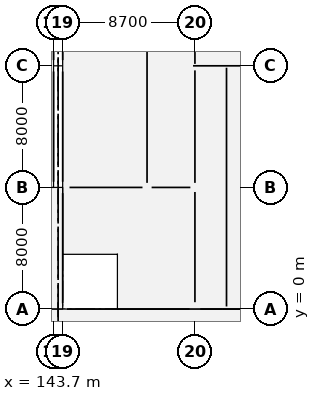
"""IFC4 building model, lengths in metres.
Left out: names, types, materials, properties, quantities, classifications, styles, units other than length and angle.
Written with IfcOpenShell. Run it as: python <this file> out.ifc"""

import sys

from ifc_helpers import new_model, si_unit, direction, frame, frame_2d, origin, origin_2d, place, context, subcontext, project, spatial, rectangle, extrude, element, fill, save


model = new_model("IFC4")
c1 = context("Model", 3, precision=1e-05, world=origin(), true_north=direction((0.0, 1.0)))
c2 = subcontext(c1, "Body", "Model", "MODEL_VIEW")
j1 = project(units=[si_unit("LENGTHUNIT", "METRE"), si_unit("PLANEANGLEUNIT", "RADIAN")], contexts=[c1])
p1 = place(None, origin())
s1 = spatial("IfcSite", under=j1, at=p1, CompositionType="ELEMENT")
p2 = place(p1, origin())
s2 = spatial("IfcBuilding", under=s1, at=p2, CompositionType="ELEMENT")
p3 = place(p2, origin())
s3 = spatial("IfcBuildingStorey", under=s2, at=p3, CompositionType="ELEMENT", Elevation=0.0)
for number, where, z_axis, x_axis in (
    (1, (143.7, 8.0, -0.5), (0.0, 0.0, 1.0), (1.0, 0.0, 0.0)),
    (2, (143.7, 16.0, -0.5), (0.0, 0.0, 1.0), (1.0, 0.0, 0.0)),
    (3, (144.3, 0.0, -0.5), (0.0, 0.0, 1.0), (1.0, 0.0, 0.0)),
    (4, (144.3, 8.0, -0.5), (0.0, 0.0, 1.0), (1.0, 0.0, 0.0)),
    (5, (144.3, 16.0, -0.5), (0.0, 0.0, 1.0), (1.0, 0.0, 0.0)),
):
    element("IfcColumn", number, at=place(p3, frame(where, z_axis=z_axis, x_axis=x_axis)), inside=s3, PredefinedType="COLUMN", context=c2, shape_type="SweptSolid", body=[
        extrude(rectangle(XDim=0.55, YDim=0.75, at=origin_2d()), origin(), (0.0, 0.0, 1.0), 6.8),
    ])
for number, where, z_axis, x_axis in (
    (6, (153.0, 0.0, -0.5), (0.0, 0.0, 1.0), (1.0, 0.0, 0.0)),
    (7, (153.0, 8.0, -0.5), (0.0, 0.0, 1.0), (1.0, 0.0, 0.0)),
    (8, (153.0, 16.0, -0.5), (0.0, 0.0, 1.0), (1.0, 0.0, 0.0)),
):
    element("IfcColumn", number, at=place(p3, frame(where, z_axis=z_axis, x_axis=x_axis)), inside=s3, PredefinedType="COLUMN", context=c2, shape_type="SweptSolid", body=[
        extrude(rectangle(XDim=0.7, YDim=0.7, at=origin_2d()), origin(), (0.0, 0.0, 1.0), 6.8),
    ])
p4 = place(p3, frame((143.7, 8.375, 0.0), z_axis=(0.0, 0.0, 1.0), x_axis=(0.0, 1.0, 0.0)))
e9 = element("IfcWall", 9, at=p4, inside=s3, PredefinedType="SOLIDWALL", context=c2, shape_type="SweptSolid", body=[
    extrude(rectangle(XDim=7.25, YDim=0.34, at=frame_2d((3.625, 0.0))), origin(), (0.0, 0.0, 1.0), 4.98),
])
p5 = place(p4, frame((1.517, 0.0, 0.85)))
e10 = element("IfcOpeningElement", 10, at=p5, cuts=e9, PredefinedType="OPENING", context=c2, shape_type="SweptSolid", body=[
    extrude(rectangle(XDim=1.8, YDim=3.15, at=frame_2d((0.9, 1.575))), frame((0.0, 0.18, 0.0), z_axis=(0.0, -1.0, 0.0), x_axis=(1.0, 0.0, 0.0)), (0.0, 0.0, 1.0), 0.36),
])
p6 = place(p4, frame((3.933, 0.0, 0.85)))
e11 = element("IfcOpeningElement", 11, at=p6, cuts=e9, PredefinedType="OPENING", context=c2, shape_type="SweptSolid", body=[
    extrude(rectangle(XDim=1.8, YDim=3.15, at=frame_2d((0.9, 1.575))), frame((0.0, 0.18, 0.0), z_axis=(0.0, -1.0, 0.0), x_axis=(1.0, 0.0, 0.0)), (0.0, 0.0, 1.0), 0.36),
])
p7 = place(p3, frame((143.7, 16.375, 0.0), z_axis=(0.0, 0.0, 1.0), x_axis=(0.0, 1.0, 0.0)))
e12 = element("IfcWall", 12, at=p7, inside=s3, PredefinedType="SOLIDWALL", context=c2, shape_type="SweptSolid", body=[
    extrude(rectangle(XDim=7.25, YDim=0.34, at=frame_2d((3.625, 0.0))), origin(), (0.0, 0.0, 1.0), 4.98),
])
p8 = place(p7, frame((1.517, 0.0, 0.85)))
e13 = element("IfcOpeningElement", 13, at=p8, cuts=e12, PredefinedType="OPENING", context=c2, shape_type="SweptSolid", body=[
    extrude(rectangle(XDim=1.8, YDim=3.15, at=frame_2d((0.9, 1.575))), frame((0.0, 0.18, 0.0), z_axis=(0.0, -1.0, 0.0), x_axis=(1.0, 0.0, 0.0)), (0.0, 0.0, 1.0), 0.36),
])
p9 = place(p7, frame((3.933, 0.0, 0.85)))
e14 = element("IfcOpeningElement", 14, at=p9, cuts=e12, PredefinedType="OPENING", context=c2, shape_type="SweptSolid", body=[
    extrude(rectangle(XDim=1.8, YDim=3.15, at=frame_2d((0.9, 1.575))), frame((0.0, 0.18, 0.0), z_axis=(0.0, -1.0, 0.0), x_axis=(1.0, 0.0, 0.0)), (0.0, 0.0, 1.0), 0.36),
])
p10 = place(p3, frame((144.575, 0.0, 0.0), z_axis=(0.0, 0.0, 1.0), x_axis=(1.0, 0.0, 0.0)))
e15 = element("IfcWall", 15, at=p10, inside=s3, PredefinedType="SOLIDWALL", context=c2, shape_type="SweptSolid", body=[
    extrude(rectangle(XDim=8.075, YDim=0.3, at=frame_2d((4.038, 0.0))), origin(), (0.0, 0.0, 1.0), 0.45),
])
p11 = place(p3, frame((154.8, 0.0, 0.0), z_axis=(0.0, 0.0, 1.0), x_axis=(-1.0, 0.0, 0.0)))
e16 = element("IfcWall", 16, at=p11, inside=s3, PredefinedType="SOLIDWALL", context=c2, shape_type="SweptSolid", body=[
    extrude(rectangle(XDim=1.45, YDim=0.34, at=frame_2d((0.725, 0.0))), origin(), (0.0, 0.0, 1.0), 5.1),
])
p12 = place(p11, frame((0.1, 0.0, 0.0)))
e17 = element("IfcOpeningElement", 17, at=p12, cuts=e16, PredefinedType="OPENING", context=c2, shape_type="SweptSolid", body=[
    extrude(rectangle(XDim=1.2, YDim=2.25, at=frame_2d((0.6, 1.125))), frame((0.0, 0.18, 0.0), z_axis=(0.0, -1.0, 0.0), x_axis=(1.0, 0.0, 0.0)), (0.0, 0.0, 1.0), 0.36),
])
p13 = place(p3, frame((144.3, 0.375, 0.0), z_axis=(0.0, 0.0, 1.0), x_axis=(0.0, 1.0, 0.0)))
e18 = element("IfcWall", 18, at=p13, inside=s3, PredefinedType="SOLIDWALL", context=c2, shape_type="SweptSolid", body=[
    extrude(rectangle(XDim=7.25, YDim=0.34, at=frame_2d((3.625, 0.0))), origin(), (0.0, 0.0, 1.0), 5.1),
])
p14 = place(p13, frame((1.417, 0.0, 0.85)))
e19 = element("IfcOpeningElement", 19, at=p14, cuts=e18, PredefinedType="OPENING", context=c2, shape_type="SweptSolid", body=[
    extrude(rectangle(XDim=2.0, YDim=3.3, at=frame_2d((1.0, 1.65))), frame((0.0, 0.18, 0.0), z_axis=(0.0, -1.0, 0.0), x_axis=(1.0, 0.0, 0.0)), (0.0, 0.0, 1.0), 0.36),
])
p15 = place(p13, frame((3.833, 0.0, 0.85)))
e20 = element("IfcOpeningElement", 20, at=p15, cuts=e18, PredefinedType="OPENING", context=c2, shape_type="SweptSolid", body=[
    extrude(rectangle(XDim=2.0, YDim=3.3, at=frame_2d((1.0, 1.65))), frame((0.0, 0.18, 0.0), z_axis=(0.0, -1.0, 0.0), x_axis=(1.0, 0.0, 0.0)), (0.0, 0.0, 1.0), 0.36),
])
p16 = place(p3, frame((144.3, 8.375, 0.0), z_axis=(0.0, 0.0, 1.0), x_axis=(0.0, 1.0, 0.0)))
e21 = element("IfcWall", 21, at=p16, inside=s3, PredefinedType="SOLIDWALL", context=c2, shape_type="SweptSolid", body=[
    extrude(rectangle(XDim=7.25, YDim=0.34, at=frame_2d((3.625, 0.0))), origin(), (0.0, 0.0, 1.0), 5.1),
])
p17 = place(p16, frame((1.517, 0.0, 0.85)))
e22 = element("IfcOpeningElement", 22, at=p17, cuts=e21, PredefinedType="OPENING", context=c2, shape_type="SweptSolid", body=[
    extrude(rectangle(XDim=1.8, YDim=3.15, at=frame_2d((0.9, 1.575))), frame((0.0, 0.18, 0.0), z_axis=(0.0, -1.0, 0.0), x_axis=(1.0, 0.0, 0.0)), (0.0, 0.0, 1.0), 0.36),
])
p18 = place(p16, frame((3.933, 0.0, 0.85)))
e23 = element("IfcOpeningElement", 23, at=p18, cuts=e21, PredefinedType="OPENING", context=c2, shape_type="SweptSolid", body=[
    extrude(rectangle(XDim=1.8, YDim=3.15, at=frame_2d((0.9, 1.575))), frame((0.0, 0.18, 0.0), z_axis=(0.0, -1.0, 0.0), x_axis=(1.0, 0.0, 0.0)), (0.0, 0.0, 1.0), 0.36),
])
p19 = place(p3, frame((144.3, 16.375, 0.0), z_axis=(0.0, 0.0, 1.0), x_axis=(0.0, 1.0, 0.0)))
e24 = element("IfcWall", 24, at=p19, inside=s3, PredefinedType="SOLIDWALL", context=c2, shape_type="SweptSolid", body=[
    extrude(rectangle(XDim=7.25, YDim=0.34, at=frame_2d((3.625, 0.0))), origin(), (0.0, 0.0, 1.0), 5.1),
])
p20 = place(p19, frame((1.417, 0.0, 0.85)))
e25 = element("IfcOpeningElement", 25, at=p20, cuts=e24, PredefinedType="OPENING", context=c2, shape_type="SweptSolid", body=[
    extrude(rectangle(XDim=2.0, YDim=3.3, at=frame_2d((1.0, 1.65))), frame((0.0, 0.18, 0.0), z_axis=(0.0, -1.0, 0.0), x_axis=(1.0, 0.0, 0.0)), (0.0, 0.0, 1.0), 0.36),
])
p21 = place(p19, frame((3.833, 0.0, 0.85)))
e26 = element("IfcOpeningElement", 26, at=p21, cuts=e24, PredefinedType="OPENING", context=c2, shape_type="SweptSolid", body=[
    extrude(rectangle(XDim=2.0, YDim=3.3, at=frame_2d((1.0, 1.65))), frame((0.0, 0.18, 0.0), z_axis=(0.0, -1.0, 0.0), x_axis=(1.0, 0.0, 0.0)), (0.0, 0.0, 1.0), 0.36),
])
p22 = place(p3, frame((162.125, 16.0, -0.5), z_axis=(0.0, 0.0, 1.0), x_axis=(-1.0, 0.0, 0.0)))
e27 = element("IfcWall", 27, at=p22, inside=s3, PredefinedType="SOLIDWALL", context=c2, shape_type="SweptSolid", body=[
    extrude(rectangle(XDim=9.25, YDim=0.25, at=frame_2d((4.625, 0.0))), origin(), (0.0, 0.0, 1.0), 6.8),
])
p23 = place(p22, frame((7.425, 0.0, 0.5)))
e28 = element("IfcOpeningElement", 28, at=p23, cuts=e27, PredefinedType="OPENING", context=c2, shape_type="SweptSolid", body=[
    extrude(rectangle(XDim=1.2, YDim=2.2, at=frame_2d((0.6, 1.1))), frame((0.0, 0.135, 0.0), z_axis=(0.0, -1.0, 0.0), x_axis=(1.0, 0.0, 0.0)), (0.0, 0.0, 1.0), 0.27),
])
p24 = place(p3, frame((153.0, 16.125, -0.5), z_axis=(0.0, 0.0, 1.0), x_axis=(0.0, 1.0, 0.0)))
e29 = element("IfcWall", 29, at=p24, inside=s3, PredefinedType="SOLIDWALL", context=c2, shape_type="SweptSolid", body=[
    extrude(rectangle(XDim=7.75, YDim=0.25, at=frame_2d((3.875, 0.0))), origin(), (0.0, 0.0, 1.0), 6.8),
])
p25 = place(p24, frame((1.15, 0.0, 0.5)))
e30 = element("IfcOpeningElement", 30, at=p25, cuts=e29, PredefinedType="OPENING", context=c2, shape_type="SweptSolid", body=[
    extrude(rectangle(XDim=1.2, YDim=2.2, at=frame_2d((0.6, 1.1))), frame((0.0, 0.135, 0.0), z_axis=(0.0, -1.0, 0.0), x_axis=(1.0, 0.0, 0.0)), (0.0, 0.0, 1.0), 0.27),
])
p26 = place(p3, frame((153.0, 0.45, 0.0), z_axis=(0.0, 0.0, 1.0), x_axis=(0.0, 1.0, 0.0)))
e31 = element("IfcWall", 31, at=p26, inside=s3, PredefinedType="PARTITIONING", context=c2, shape_type="SweptSolid", body=[
    extrude(rectangle(XDim=7.25, YDim=0.1, at=frame_2d((3.625, 0.0))), origin(), (0.0, 0.0, 1.0), 5.35),
])
p27 = place(p26, frame((3.085, 0.0, 0.0)))
e32 = element("IfcOpeningElement", 32, at=p27, cuts=e31, PredefinedType="OPENING", context=c2, shape_type="SweptSolid", body=[
    extrude(rectangle(XDim=1.08, YDim=2.15, at=frame_2d((0.54, 1.075))), frame((0.0, 0.06, 0.0), z_axis=(0.0, -1.0, 0.0), x_axis=(1.0, 0.0, 0.0)), (0.0, 0.0, 1.0), 0.12),
])
p28 = place(p3, frame((150.15, 8.0, 0.0), z_axis=(0.0, 0.0, 1.0), x_axis=(1.0, 0.0, 0.0)))
e33 = element("IfcWall", 33, at=p28, inside=s3, PredefinedType="PARTITIONING", context=c2, shape_type="SweptSolid", body=[
    extrude(rectangle(XDim=2.55, YDim=0.14, at=frame_2d((1.275, 0.0))), origin(), (0.0, 0.0, 1.0), 5.25),
])
p29 = place(p28, frame((0.805, 0.0, 0.0)))
e34 = element("IfcOpeningElement", 34, at=p29, cuts=e33, PredefinedType="OPENING", context=c2, shape_type="SweptSolid", body=[
    extrude(rectangle(XDim=0.94, YDim=2.14, at=frame_2d((0.47, 1.07))), frame((0.0, 0.08, 0.0), z_axis=(0.0, -1.0, 0.0), x_axis=(1.0, 0.0, 0.0)), (0.0, 0.0, 1.0), 0.16),
])
p30 = place(p3, frame((144.75, 8.0, 0.0), z_axis=(0.0, 0.0, 1.0), x_axis=(1.0, 0.0, 0.0)))
e35 = element("IfcWall", 35, at=p30, inside=s3, PredefinedType="PARTITIONING", context=c2, shape_type="SweptSolid", body=[
    extrude(rectangle(XDim=4.8, YDim=0.125, at=frame_2d((2.4, 0.0))), origin(), (0.0, 0.0, 1.0), 5.25),
])
p31 = place(p3, frame((153.0, 8.3, 0.0), z_axis=(0.0, 0.0, 1.0), x_axis=(0.0, 1.0, 0.0)))
e36 = element("IfcWall", 36, at=p31, inside=s3, PredefinedType="PARTITIONING", context=c2, shape_type="SweptSolid", body=[
    extrude(rectangle(XDim=7.4, YDim=0.1, at=frame_2d((3.7, 0.0))), origin(), (0.0, 0.0, 1.0), 5.35),
])
p32 = place(p31, frame((2.83, 0.0, 0.0)))
e37 = element("IfcOpeningElement", 37, at=p32, cuts=e36, PredefinedType="OPENING", context=c2, shape_type="SweptSolid", body=[
    extrude(rectangle(XDim=1.74, YDim=2.28, at=frame_2d((0.87, 1.14))), frame((0.0, 0.06, 0.0), z_axis=(0.0, -1.0, 0.0), x_axis=(1.0, 0.0, 0.0)), (0.0, 0.0, 1.0), 0.12),
])
p33 = place(p3, frame((149.85, 8.3, 0.0), z_axis=(0.0, 0.0, 1.0), x_axis=(0.0, 1.0, 0.0)))
e38 = element("IfcWall", 38, at=p33, inside=s3, PredefinedType="PARTITIONING", context=c2, shape_type="SweptSolid", body=[
    extrude(rectangle(XDim=15.4, YDim=0.1, at=frame_2d((7.7, 0.0))), origin(), (0.0, 0.0, 1.0), 5.95),
])
p34 = place(p33, frame((3.31, 0.0, 0.0)))
e39 = element("IfcOpeningElement", 39, at=p34, cuts=e38, PredefinedType="OPENING", context=c2, shape_type="SweptSolid", body=[
    extrude(rectangle(XDim=1.08, YDim=2.15, at=frame_2d((0.54, 1.075))), frame((0.0, 0.06, 0.0), z_axis=(0.0, -1.0, 0.0), x_axis=(1.0, 0.0, 0.0)), (0.0, 0.0, 1.0), 0.12),
])
p35 = place(p3, frame((155.077, 0.17, 0.0), z_axis=(0.0, 0.0, 1.0), x_axis=(0.0, 1.0, 0.0)))
e40 = element("IfcWall", 40, at=p35, inside=s3, PredefinedType="STANDARD", context=c2, shape_type="SweptSolid", body=[
    extrude(rectangle(XDim=15.705, YDim=0.255, at=frame_2d((7.853, 0.0))), origin(), (0.0, 0.0, 1.0), 5.95),
])
p36 = place(p3, frame((154.8, 0.0, 0.0), z_axis=(0.0, 0.0, 1.0), x_axis=(1.0, 0.0, 0.0)))
e41 = element("IfcWall", 41, at=p36, inside=s3, PredefinedType="SOLIDWALL", context=c2, shape_type="SweptSolid", body=[
    extrude(rectangle(XDim=6.85, YDim=0.34, at=frame_2d((3.425, 0.0))), origin(), (0.0, 0.0, 1.0), 5.1),
])
p37 = place(p36, frame((1.5, 0.0, 0.0)))
e42 = element("IfcOpeningElement", 42, at=p37, cuts=e41, PredefinedType="OPENING", context=c2, shape_type="SweptSolid", body=[
    extrude(rectangle(XDim=2.4, YDim=3.1, at=frame_2d((1.2, 1.55))), frame((0.0, 0.18, 0.0), z_axis=(0.0, -1.0, 0.0), x_axis=(1.0, 0.0, 0.0)), (0.0, 0.0, 1.0), 0.36),
])
p38 = place(p5, origin())
e43 = element("IfcWindow", 43, at=p38, inside=s3, PartitioningType="DOUBLE_PANEL_VERTICAL", PredefinedType="WINDOW", context=c2, shape_type="SweptSolid", body=[
    extrude(rectangle(XDim=1.8, YDim=3.15, at=frame_2d((0.9, 1.575))), frame((0.0, 0.03, 0.0), z_axis=(0.0, -1.0, 0.0), x_axis=(1.0, 0.0, 0.0)), (0.0, 0.0, 1.0), 0.06),
])
fill(e10, e43)
p39 = place(p6, origin())
e44 = element("IfcWindow", 44, at=p39, inside=s3, PartitioningType="DOUBLE_PANEL_VERTICAL", PredefinedType="WINDOW", context=c2, shape_type="SweptSolid", body=[
    extrude(rectangle(XDim=1.8, YDim=3.15, at=frame_2d((0.9, 1.575))), frame((0.0, 0.03, 0.0), z_axis=(0.0, -1.0, 0.0), x_axis=(1.0, 0.0, 0.0)), (0.0, 0.0, 1.0), 0.06),
])
fill(e11, e44)
p40 = place(p14, origin())
e45 = element("IfcWindow", 45, at=p40, inside=s3, PartitioningType="DOUBLE_PANEL_VERTICAL", PredefinedType="WINDOW", context=c2, shape_type="SweptSolid", body=[
    extrude(rectangle(XDim=2.0, YDim=3.3, at=frame_2d((1.0, 1.65))), frame((0.0, 0.03, 0.0), z_axis=(0.0, -1.0, 0.0), x_axis=(1.0, 0.0, 0.0)), (0.0, 0.0, 1.0), 0.06),
])
fill(e19, e45)
p41 = place(p15, origin())
e46 = element("IfcWindow", 46, at=p41, inside=s3, PartitioningType="DOUBLE_PANEL_VERTICAL", PredefinedType="WINDOW", context=c2, shape_type="SweptSolid", body=[
    extrude(rectangle(XDim=2.0, YDim=3.3, at=frame_2d((1.0, 1.65))), frame((0.0, 0.03, 0.0), z_axis=(0.0, -1.0, 0.0), x_axis=(1.0, 0.0, 0.0)), (0.0, 0.0, 1.0), 0.06),
])
fill(e20, e46)
p42 = place(p17, origin())
e47 = element("IfcWindow", 47, at=p42, inside=s3, PartitioningType="DOUBLE_PANEL_VERTICAL", PredefinedType="WINDOW", context=c2, shape_type="SweptSolid", body=[
    extrude(rectangle(XDim=1.8, YDim=3.15, at=frame_2d((0.9, 1.575))), frame((0.0, 0.03, 0.0), z_axis=(0.0, -1.0, 0.0), x_axis=(1.0, 0.0, 0.0)), (0.0, 0.0, 1.0), 0.06),
])
fill(e22, e47)
p43 = place(p18, origin())
e48 = element("IfcWindow", 48, at=p43, inside=s3, PartitioningType="DOUBLE_PANEL_VERTICAL", PredefinedType="WINDOW", context=c2, shape_type="SweptSolid", body=[
    extrude(rectangle(XDim=1.8, YDim=3.15, at=frame_2d((0.9, 1.575))), frame((0.0, 0.03, 0.0), z_axis=(0.0, -1.0, 0.0), x_axis=(1.0, 0.0, 0.0)), (0.0, 0.0, 1.0), 0.06),
])
fill(e23, e48)
p44 = place(p27, origin())
e49 = element("IfcDoor", 49, at=p44, inside=s3, OperationType="SINGLE_SWING_LEFT", PredefinedType="DOOR", context=c2, shape_type="SweptSolid", body=[
    extrude(rectangle(XDim=1.08, YDim=2.15, at=frame_2d((0.54, 1.075))), frame((0.0, 0.025, 0.0), z_axis=(0.0, -1.0, 0.0), x_axis=(1.0, 0.0, 0.0)), (0.0, 0.0, 1.0), 0.05),
])
fill(e32, e49)
p45 = place(p29, origin())
e50 = element("IfcDoor", 50, at=p45, inside=s3, OperationType="SINGLE_SWING_RIGHT", PredefinedType="DOOR", context=c2, shape_type="SweptSolid", body=[
    extrude(rectangle(XDim=0.94, YDim=2.14, at=frame_2d((0.47, 1.07))), frame((0.0, 0.025, 0.0), z_axis=(0.0, -1.0, 0.0), x_axis=(1.0, 0.0, 0.0)), (0.0, 0.0, 1.0), 0.05),
])
fill(e34, e50)
p46 = place(p32, origin())
e51 = element("IfcDoor", 51, at=p46, inside=s3, OperationType="DOUBLE_DOOR_SINGLE_SWING", PredefinedType="DOOR", context=c2, shape_type="SweptSolid", body=[
    extrude(rectangle(XDim=1.74, YDim=2.28, at=frame_2d((0.87, 1.14))), frame((0.0, 0.025, 0.0), z_axis=(0.0, -1.0, 0.0), x_axis=(1.0, 0.0, 0.0)), (0.0, 0.0, 1.0), 0.05),
])
fill(e37, e51)
p47 = place(p34, origin())
e52 = element("IfcDoor", 52, at=p47, inside=s3, OperationType="SINGLE_SWING_RIGHT", PredefinedType="DOOR", context=c2, shape_type="SweptSolid", body=[
    extrude(rectangle(XDim=1.08, YDim=2.15, at=frame_2d((0.54, 1.075))), frame((0.0, 0.025, 0.0), z_axis=(0.0, -1.0, 0.0), x_axis=(1.0, 0.0, 0.0)), (0.0, 0.0, 1.0), 0.05),
])
fill(e39, e52)
p48 = place(p23, origin())
e53 = element("IfcDoor", 53, at=p48, inside=s3, OperationType="SINGLE_SWING_RIGHT", PredefinedType="DOOR", context=c2, shape_type="SweptSolid", body=[
    extrude(rectangle(XDim=1.2, YDim=2.2, at=frame_2d((0.6, 1.1))), frame((0.0, 0.025, 0.0), z_axis=(0.0, -1.0, 0.0), x_axis=(1.0, 0.0, 0.0)), (0.0, 0.0, 1.0), 0.05),
])
fill(e28, e53)
p49 = place(p12, origin())
e54 = element("IfcDoor", 54, at=p49, inside=s3, OperationType="SINGLE_SWING_LEFT", PredefinedType="DOOR", context=c2, shape_type="SweptSolid", body=[
    extrude(rectangle(XDim=1.2, YDim=2.25, at=frame_2d((0.6, 1.125))), frame((0.0, 0.025, 0.0), z_axis=(0.0, -1.0, 0.0), x_axis=(1.0, 0.0, 0.0)), (0.0, 0.0, 1.0), 0.05),
])
fill(e17, e54)
save(model, sys.argv[1])
